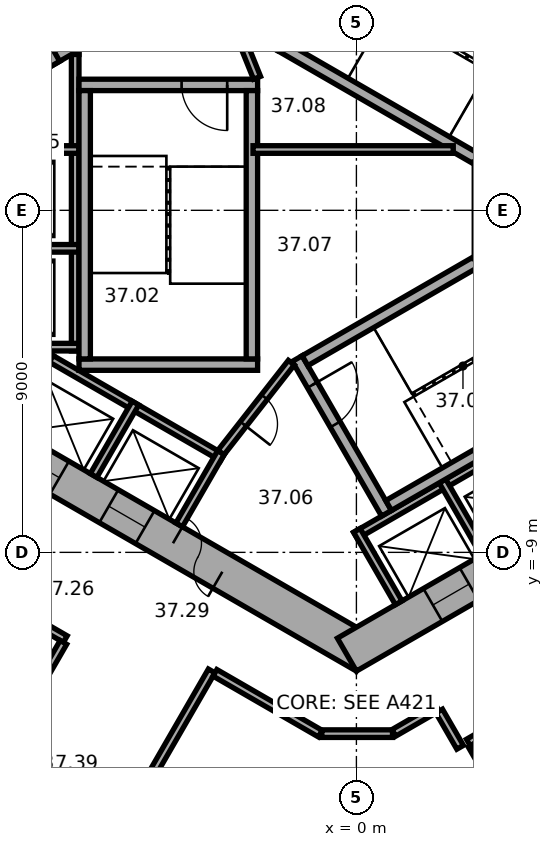
"""IFC4 building model, lengths in metres.
Left out: names, types, materials, properties, quantities, classifications, styles, units other than length and angle.
Written with IfcOpenShell. Run it as: python <this file> out.ifc"""

import sys

from ifc_helpers import new_model, si_unit, direction, frame, frame_2d, origin, place, context, subcontext, project, spatial, rectangle, extrude, element, fill, save


model = new_model("IFC4")
c1 = context("Model", 3, precision=1e-05, world=origin(), true_north=direction((0.0, 1.0)))
c2 = subcontext(c1, "Body", "Model", "MODEL_VIEW")
j1 = project(units=[si_unit("LENGTHUNIT", "METRE"), si_unit("PLANEANGLEUNIT", "RADIAN")], contexts=[c1])
p1 = place(None, origin())
s1 = spatial("IfcSite", under=j1, at=p1, CompositionType="ELEMENT")
p2 = place(p1, origin())
s2 = spatial("IfcBuilding", under=s1, at=p2, CompositionType="ELEMENT")
p3 = place(p2, frame((0.0, 0.0, 154.0)))
s3 = spatial("IfcBuildingStorey", under=s2, at=p3, CompositionType="ELEMENT", Elevation=154.0)
p4 = place(p3, frame((-10.25, -5.629, 0.0), z_axis=(0.0, 0.0, 1.0), x_axis=(0.866022616891, -0.50000482701, 0.0)))
e1 = element("IfcWall", 1, at=p4, inside=s3, PredefinedType="SHEAR", context=c2, shape_type="SweptSolid", body=[
    extrude(rectangle(XDim=12.125, YDim=1.0, at=frame_2d((6.062, 0.0))), origin(), (0.0, 0.0, 1.0), 3.7),
])
p5 = place(p4, frame((6.262, 0.0, 0.0)))
e2 = element("IfcOpeningElement", 2, at=p5, cuts=e1, PredefinedType="OPENING", context=c2, shape_type="SweptSolid", body=[
    extrude(rectangle(XDim=1.5, YDim=2.1, at=frame_2d((0.75, 1.05))), frame((0.0, 0.51, 0.0), z_axis=(0.0, -1.0, 0.0), x_axis=(1.0, 0.0, 0.0)), (0.0, 0.0, 1.0), 1.02),
])
p6 = place(p4, frame((1.712, 0.0, 0.0)))
e3 = element("IfcOpeningElement", 3, at=p6, cuts=e1, PredefinedType="OPENING", context=c2, shape_type="SweptSolid", body=[
    extrude(rectangle(XDim=1.1, YDim=2.1, at=frame_2d((0.55, 1.05))), frame((0.0, 0.51, 0.0), z_axis=(0.0, -1.0, 0.0), x_axis=(1.0, 0.0, 0.0)), (0.0, 0.0, 1.0), 1.02),
])
p7 = place(p4, frame((4.312, 0.0, 0.0)))
e4 = element("IfcOpeningElement", 4, at=p7, cuts=e1, PredefinedType="OPENING", context=c2, shape_type="SweptSolid", body=[
    extrude(rectangle(XDim=1.1, YDim=2.1, at=frame_2d((0.55, 1.05))), frame((0.0, 0.51, 0.0), z_axis=(0.0, -1.0, 0.0), x_axis=(1.0, 0.0, 0.0)), (0.0, 0.0, 1.0), 1.02),
])
p8 = place(p3, frame((-0.25, -11.691, 0.0), z_axis=(0.0, 0.0, 1.0), x_axis=(0.866022616891, 0.50000482701, 0.0)))
e5 = element("IfcWall", 5, at=p8, inside=s3, PredefinedType="SHEAR", context=c2, shape_type="SweptSolid", body=[
    extrude(rectangle(XDim=12.125, YDim=1.0, at=frame_2d((6.062, 0.0))), origin(), (0.0, 0.0, 1.0), 3.7),
])
p9 = place(p8, frame((2.612, 0.0, 0.0)))
e6 = element("IfcOpeningElement", 6, at=p9, cuts=e5, PredefinedType="OPENING", context=c2, shape_type="SweptSolid", body=[
    extrude(rectangle(XDim=1.1, YDim=2.1, at=frame_2d((0.55, 1.05))), frame((0.0, 0.51, 0.0), z_axis=(0.0, -1.0, 0.0), x_axis=(1.0, 0.0, 0.0)), (0.0, 0.0, 1.0), 1.02),
])
p10 = place(p8, frame((5.212, 0.0, 0.0)))
e7 = element("IfcOpeningElement", 7, at=p10, cuts=e5, PredefinedType="OPENING", context=c2, shape_type="SweptSolid", body=[
    extrude(rectangle(XDim=1.1, YDim=2.1, at=frame_2d((0.55, 1.05))), frame((0.0, 0.51, 0.0), z_axis=(0.0, -1.0, 0.0), x_axis=(1.0, 0.0, 0.0)), (0.0, 0.0, 1.0), 1.02),
])
p11 = place(p8, frame((7.812, 0.0, 0.0)))
e8 = element("IfcOpeningElement", 8, at=p11, cuts=e5, PredefinedType="OPENING", context=c2, shape_type="SweptSolid", body=[
    extrude(rectangle(XDim=1.1, YDim=2.1, at=frame_2d((0.55, 1.05))), frame((0.0, 0.51, 0.0), z_axis=(0.0, -1.0, 0.0), x_axis=(1.0, 0.0, 0.0)), (0.0, 0.0, 1.0), 1.02),
])
p12 = place(p3, frame((-18.789, -14.267, 0.0), z_axis=(0.0, 0.0, 1.0), x_axis=(0.866023315909, -0.500003616288, 0.0)))
e9 = element("IfcWall", 9, at=p12, inside=s3, PredefinedType="STANDARD", context=c2, shape_type="SweptSolid", body=[
    extrude(rectangle(XDim=20.044, YDim=0.2, at=frame_2d((10.022, 0.0))), origin(), (0.0, 0.0, 1.0), 3.7),
])
p13 = place(p12, frame((1.314, 0.0, 0.9)))
e10 = element("IfcOpeningElement", 10, at=p13, cuts=e9, PredefinedType="OPENING", context=c2, shape_type="SweptSolid", body=[
    extrude(rectangle(XDim=2.4, YDim=2.0, at=frame_2d((1.2, 1.0))), frame((0.0, 0.11, 0.0), z_axis=(0.0, -1.0, 0.0), x_axis=(1.0, 0.0, 0.0)), (0.0, 0.0, 1.0), 0.22),
])
p14 = place(p12, frame((5.069, 0.0, 0.9)))
e11 = element("IfcOpeningElement", 11, at=p14, cuts=e9, PredefinedType="OPENING", context=c2, shape_type="SweptSolid", body=[
    extrude(rectangle(XDim=2.4, YDim=2.0, at=frame_2d((1.2, 1.0))), frame((0.0, 0.11, 0.0), z_axis=(0.0, -1.0, 0.0), x_axis=(1.0, 0.0, 0.0)), (0.0, 0.0, 1.0), 0.22),
])
p15 = place(p12, frame((8.823, 0.0, 0.9)))
e12 = element("IfcOpeningElement", 12, at=p15, cuts=e9, PredefinedType="OPENING", context=c2, shape_type="SweptSolid", body=[
    extrude(rectangle(XDim=2.4, YDim=2.0, at=frame_2d((1.2, 1.0))), frame((0.0, 0.11, 0.0), z_axis=(0.0, -1.0, 0.0), x_axis=(1.0, 0.0, 0.0)), (0.0, 0.0, 1.0), 0.22),
])
p16 = place(p12, frame((12.577, 0.0, 0.9)))
e13 = element("IfcOpeningElement", 13, at=p16, cuts=e9, PredefinedType="OPENING", context=c2, shape_type="SweptSolid", body=[
    extrude(rectangle(XDim=2.4, YDim=2.0, at=frame_2d((1.2, 1.0))), frame((0.0, 0.11, 0.0), z_axis=(0.0, -1.0, 0.0), x_axis=(1.0, 0.0, 0.0)), (0.0, 0.0, 1.0), 0.22),
])
p17 = place(p12, frame((16.331, 0.0, 0.9)))
e14 = element("IfcOpeningElement", 14, at=p17, cuts=e9, PredefinedType="OPENING", context=c2, shape_type="SweptSolid", body=[
    extrude(rectangle(XDim=2.4, YDim=2.0, at=frame_2d((1.2, 1.0))), frame((0.0, 0.11, 0.0), z_axis=(0.0, -1.0, 0.0), x_axis=(1.0, 0.0, 0.0)), (0.0, 0.0, 1.0), 0.22),
])
p18 = place(p3, frame((2.911, -24.156, 0.0), z_axis=(0.0, 0.0, 1.0), x_axis=(0.833882163564, 0.551942512668, 0.0)))
e15 = element("IfcWall", 15, at=p18, inside=s3, PredefinedType="STANDARD", context=c2, shape_type="SweptSolid", body=[
    extrude(rectangle(XDim=20.044, YDim=0.2, at=frame_2d((10.022, 0.0))), origin(), (0.0, 0.0, 1.0), 3.7),
])
p19 = place(p18, frame((1.313, 0.0, 0.9)))
e16 = element("IfcOpeningElement", 16, at=p19, cuts=e15, PredefinedType="OPENING", context=c2, shape_type="SweptSolid", body=[
    extrude(rectangle(XDim=2.4, YDim=2.0, at=frame_2d((1.2, 1.0))), frame((0.0, 0.11, 0.0), z_axis=(0.0, -1.0, 0.0), x_axis=(1.0, 0.0, 0.0)), (0.0, 0.0, 1.0), 0.22),
])
p20 = place(p18, frame((5.067, 0.0, 0.9)))
e17 = element("IfcOpeningElement", 17, at=p20, cuts=e15, PredefinedType="OPENING", context=c2, shape_type="SweptSolid", body=[
    extrude(rectangle(XDim=2.4, YDim=2.0, at=frame_2d((1.2, 1.0))), frame((0.0, 0.11, 0.0), z_axis=(0.0, -1.0, 0.0), x_axis=(1.0, 0.0, 0.0)), (0.0, 0.0, 1.0), 0.22),
])
p21 = place(p18, frame((8.821, 0.0, 0.9)))
e18 = element("IfcOpeningElement", 18, at=p21, cuts=e15, PredefinedType="OPENING", context=c2, shape_type="SweptSolid", body=[
    extrude(rectangle(XDim=2.4, YDim=2.0, at=frame_2d((1.2, 1.0))), frame((0.0, 0.11, 0.0), z_axis=(0.0, -1.0, 0.0), x_axis=(1.0, 0.0, 0.0)), (0.0, 0.0, 1.0), 0.22),
])
p22 = place(p18, frame((12.575, 0.0, 0.9)))
e19 = element("IfcOpeningElement", 19, at=p22, cuts=e15, PredefinedType="OPENING", context=c2, shape_type="SweptSolid", body=[
    extrude(rectangle(XDim=2.4, YDim=2.0, at=frame_2d((1.2, 1.0))), frame((0.0, 0.11, 0.0), z_axis=(0.0, -1.0, 0.0), x_axis=(1.0, 0.0, 0.0)), (0.0, 0.0, 1.0), 0.22),
])
p23 = place(p18, frame((16.329, 0.0, 0.9)))
e20 = element("IfcOpeningElement", 20, at=p23, cuts=e15, PredefinedType="OPENING", context=c2, shape_type="SweptSolid", body=[
    extrude(rectangle(XDim=2.4, YDim=2.0, at=frame_2d((1.2, 1.0))), frame((0.0, 0.11, 0.0), z_axis=(0.0, -1.0, 0.0), x_axis=(1.0, 0.0, 0.0)), (0.0, 0.0, 1.0), 0.22),
])
p24 = place(p3, frame((-7.4, 4.3, 0.0), z_axis=(0.0, 0.0, 1.0), x_axis=(0.0, -1.0, 0.0)))
e21 = element("IfcWall", 21, at=p24, inside=s3, PredefinedType="PARTITIONING", context=c2, shape_type="SweptSolid", body=[
    extrude(rectangle(XDim=8.0, YDim=0.2, at=frame_2d((4.0, 0.0))), origin(), (0.0, 0.0, 1.0), 3.42),
])
for number, where, z_axis, x_axis in (
    (22, (-7.3, 4.2, 0.0), (0.0, 0.0, 1.0), (-1.0, 0.0, 0.0)),
    (23, (-7.3, 1.6, 0.0), (0.0, 0.0, 1.0), (-1.0, 0.0, 0.0)),
    (24, (-7.3, -1.0, 0.0), (0.0, 0.0, 1.0), (-1.0, 0.0, 0.0)),
    (25, (-7.3, -3.6, 0.0), (0.0, 0.0, 1.0), (-1.0, 0.0, 0.0)),
):
    element("IfcWall", number, at=place(p3, frame(where, z_axis=z_axis, x_axis=x_axis)), inside=s3, PredefinedType="PARTITIONING", context=c2, shape_type="SweptSolid", body=[
        extrude(rectangle(XDim=2.2, YDim=0.2, at=frame_2d((1.1, 0.0))), origin(), (0.0, 0.0, 1.0), 3.42),
    ])
p25 = place(p3, frame((-8.203, -3.809, 0.0), z_axis=(0.0, 0.0, 1.0), x_axis=(0.866028230842, -0.499995103361, 0.0)))
e26 = element("IfcWall", 26, at=p25, inside=s3, PredefinedType="PARTITIONING", context=c2, shape_type="SweptSolid", body=[
    extrude(rectangle(XDim=5.4, YDim=0.2, at=frame_2d((2.7, 0.0))), origin(), (0.0, 0.0, 1.0), 3.42),
])
for number, where, z_axis, x_axis in (
    (27, (-8.067, -3.772, 0.0), (0.0, 0.0, 1.0), (-0.5, -0.866, 0.0)),
    (28, (-5.815, -5.072, 0.0), (0.0, 0.0, 1.0), (-0.5, -0.866, 0.0)),
):
    element("IfcWall", number, at=place(p3, frame(where, z_axis=z_axis, x_axis=x_axis)), inside=s3, PredefinedType="PARTITIONING", context=c2, shape_type="SweptSolid", body=[
        extrude(rectangle(XDim=2.2, YDim=0.2, at=frame_2d((1.1, 0.0))), origin(), (0.0, 0.0, 1.0), 3.42),
    ])
p26 = place(p3, frame((-3.563, -6.372, 0.0), z_axis=(0.0, 0.0, 1.0), x_axis=(-0.499994660107, -0.866028486751, 0.0)))
e29 = element("IfcWall", 29, at=p26, inside=s3, PredefinedType="PARTITIONING", context=c2, shape_type="SweptSolid", body=[
    extrude(rectangle(XDim=2.2, YDim=0.2, at=frame_2d((1.1, 0.0))), origin(), (0.0, 0.0, 1.0), 3.42),
])
p27 = place(p3, frame((-0.024, -8.559, 0.0), z_axis=(0.0, 0.0, 1.0), x_axis=(0.866026010844, 0.49999894854, 0.0)))
e30 = element("IfcWall", 30, at=p27, inside=s3, PredefinedType="PARTITIONING", context=c2, shape_type="SweptSolid", body=[
    extrude(rectangle(XDim=8.0, YDim=0.2, at=frame_2d((4.0, 0.0))), origin(), (0.0, 0.0, 1.0), 3.42),
])
for number, where, z_axis, x_axis in (
    (31, (0.013, -8.422, 0.0), (0.0, 0.0, 1.0), (0.5, -0.866, 0.0)),
    (32, (2.264, -7.122, 0.0), (0.0, 0.0, 1.0), (0.5, -0.866, 0.0)),
):
    element("IfcWall", number, at=place(p3, frame(where, z_axis=z_axis, x_axis=x_axis)), inside=s3, PredefinedType="PARTITIONING", context=c2, shape_type="SweptSolid", body=[
        extrude(rectangle(XDim=2.2, YDim=0.2, at=frame_2d((1.1, 0.0))), origin(), (0.0, 0.0, 1.0), 3.42),
    ])
p28 = place(p3, frame((4.103, 0.807, 0.0), z_axis=(0.0, 0.0, 1.0), x_axis=(-0.866027801685, 0.499995846692, 0.0)))
e33 = element("IfcWall", 33, at=p28, inside=s3, PredefinedType="SHEAR", context=c2, shape_type="SweptSolid", body=[
    extrude(rectangle(XDim=7.06, YDim=0.3, at=frame_2d((3.53, 0.0))), origin(), (0.0, 0.0, 1.0), 3.42),
])
p29 = place(p3, frame((-2.6, 3.3, 0.0), z_axis=(0.0, 0.0, 1.0), x_axis=(-1.0, 0.0, 0.0)))
e34 = element("IfcWall", 34, at=p29, inside=s3, PredefinedType="SHEAR", context=c2, shape_type="SweptSolid", body=[
    extrude(rectangle(XDim=4.7, YDim=0.3, at=frame_2d((2.35, 0.0))), origin(), (0.0, 0.0, 1.0), 3.42),
])
p30 = place(p29, frame((0.8, 0.0, 0.0)))
e35 = element("IfcOpeningElement", 35, at=p30, cuts=e34, PredefinedType="OPENING", context=c2, shape_type="SweptSolid", body=[
    extrude(rectangle(XDim=1.2, YDim=2.1, at=frame_2d((0.6, 1.05))), frame((0.0, 0.16, 0.0), z_axis=(0.0, -1.0, 0.0), x_axis=(1.0, 0.0, 0.0)), (0.0, 0.0, 1.0), 0.32),
])
p31 = place(p3, frame((-2.6, -4.06, 0.0), z_axis=(0.0, 0.0, 1.0), x_axis=(-1.0, 0.0, 0.0)))
e36 = element("IfcWall", 36, at=p31, inside=s3, PredefinedType="SHEAR", context=c2, shape_type="SweptSolid", body=[
    extrude(rectangle(XDim=4.7, YDim=0.3, at=frame_2d((2.35, 0.0))), origin(), (0.0, 0.0, 1.0), 3.42),
])
for number, where, z_axis, x_axis in (
    (37, (-2.75, 3.15, 0.0), (0.0, 0.0, 1.0), (0.0, -1.0, 0.0)),
    (38, (-7.15, 3.15, 0.0), (0.0, 0.0, 1.0), (0.0, -1.0, 0.0)),
):
    element("IfcWall", number, at=place(p3, frame(where, z_axis=z_axis, x_axis=x_axis)), inside=s3, PredefinedType="SHEAR", context=c2, shape_type="SweptSolid", body=[
        extrude(rectangle(XDim=7.06, YDim=0.3, at=frame_2d((3.53, 0.0))), origin(), (0.0, 0.0, 1.0), 3.42),
    ])
p32 = place(p3, frame((-1.558, -3.902, 0.0), z_axis=(0.0, 0.0, 1.0), x_axis=(0.499977259774, -0.866038532462, 0.0)))
e39 = element("IfcWall", 39, at=p32, inside=s3, PredefinedType="SHEAR", context=c2, shape_type="SweptSolid", body=[
    extrude(rectangle(XDim=4.7, YDim=0.3, at=frame_2d((2.35, 0.0))), origin(), (0.0, 0.0, 1.0), 3.42),
])
p33 = place(p32, frame((0.8, 0.0, 0.0)))
e40 = element("IfcOpeningElement", 40, at=p33, cuts=e39, PredefinedType="OPENING", context=c2, shape_type="SweptSolid", body=[
    extrude(rectangle(XDim=1.2, YDim=2.1, at=frame_2d((0.6, 1.05))), frame((0.0, 0.16, 0.0), z_axis=(0.0, -1.0, 0.0), x_axis=(1.0, 0.0, 0.0)), (0.0, 0.0, 1.0), 0.32),
])
for number, where, z_axis, x_axis in (
    (41, (-1.353, -3.957, 0.0), (0.0, 0.0, 1.0), (0.866, 0.5, 0.0)),
    (42, (0.847, -7.767, 0.0), (0.0, 0.0, 1.0), (0.866, 0.5, 0.0)),
):
    element("IfcWall", number, at=place(p3, frame(where, z_axis=z_axis, x_axis=x_axis)), inside=s3, PredefinedType="SHEAR", context=c2, shape_type="SweptSolid", body=[
        extrude(rectangle(XDim=7.06, YDim=0.3, at=frame_2d((3.53, 0.0))), origin(), (0.0, 0.0, 1.0), 3.42),
    ])
p34 = place(p3, frame((-5.24, 5.577, 0.0), z_axis=(0.0, 0.0, 1.0), x_axis=(-0.866014461049, -0.500018952895, 0.0)))
e43 = element("IfcWall", 43, at=p34, inside=s3, PredefinedType="SHEAR", context=c2, shape_type="SweptSolid", body=[
    extrude(rectangle(XDim=3.35, YDim=0.3, at=frame_2d((1.675, 0.0))), origin(), (0.0, 0.0, 1.0), 3.42),
])
p35 = place(p3, frame((-7.937, 3.847, 0.0), z_axis=(0.0, 0.0, 1.0), x_axis=(-0.50002983664, 0.866008176907, 0.0)))
e44 = element("IfcWall", 44, at=p35, inside=s3, PredefinedType="SHEAR", context=c2, shape_type="SweptSolid", body=[
    extrude(rectangle(XDim=2.2, YDim=0.3, at=frame_2d((1.1, 0.0))), origin(), (0.0, 0.0, 1.0), 3.42),
])
p36 = place(p3, frame((-2.615, 3.487, 0.0), z_axis=(0.0, 0.0, 1.0), x_axis=(-0.373576831041, 0.92759924068, 0.0)))
e45 = element("IfcWall", 45, at=p36, inside=s3, PredefinedType="PARTITIONING", context=c2, shape_type="SweptSolid", body=[
    extrude(rectangle(XDim=3.002, YDim=0.2, at=frame_2d((1.501, 0.0))), origin(), (0.0, 0.0, 1.0), 3.42),
])
p37 = place(p36, frame((1.15, 0.0, 0.0)))
e46 = element("IfcOpeningElement", 46, at=p37, cuts=e45, PredefinedType="OPENING", context=c2, shape_type="SweptSolid", body=[
    extrude(rectangle(XDim=0.9, YDim=2.1, at=frame_2d((0.45, 1.05))), frame((0.0, 0.11, 0.0), z_axis=(0.0, -1.0, 0.0), x_axis=(1.0, 0.0, 0.0)), (0.0, 0.0, 1.0), 0.22),
])
p38 = place(p3, frame((-1.712, -4.008, 0.0), z_axis=(0.0, 0.0, 1.0), x_axis=(-0.616549420702, -0.787316208287, 0.0)))
e47 = element("IfcWall", 47, at=p38, inside=s3, PredefinedType="PARTITIONING", context=c2, shape_type="SweptSolid", body=[
    extrude(rectangle(XDim=3.002, YDim=0.2, at=frame_2d((1.501, 0.0))), origin(), (0.0, 0.0, 1.0), 3.42),
])
p39 = place(p38, frame((1.15, 0.0, 0.0)))
e48 = element("IfcOpeningElement", 48, at=p39, cuts=e47, PredefinedType="OPENING", context=c2, shape_type="SweptSolid", body=[
    extrude(rectangle(XDim=0.9, YDim=2.1, at=frame_2d((0.45, 1.05))), frame((0.0, 0.11, 0.0), z_axis=(0.0, -1.0, 0.0), x_axis=(1.0, 0.0, 0.0)), (0.0, 0.0, 1.0), 0.22),
])
p40 = place(p3, frame((-2.72, 1.6, 0.0), z_axis=(0.0, 0.0, 1.0), x_axis=(1.0, 0.0, 0.0)))
e49 = element("IfcWall", 49, at=p40, inside=s3, PredefinedType="PARTITIONING", context=c2, shape_type="SweptSolid", body=[
    extrude(rectangle(XDim=5.269, YDim=0.2, at=frame_2d((2.634, 0.0))), origin(), (0.0, 0.0, 1.0), 3.42),
])
p41 = place(p3, frame((-11.435, -9.103, 0.0), z_axis=(0.0, 0.0, 1.0), x_axis=(0.866007399799, -0.500031182522, 0.0)))
e50 = element("IfcWall", 50, at=p41, inside=s3, PredefinedType="PARTITIONING", context=c2, shape_type="SweptSolid", body=[
    extrude(rectangle(XDim=4.358, YDim=0.2, at=frame_2d((2.179, 0.0))), origin(), (0.0, 0.0, 1.0), 3.42),
])
p42 = place(p3, frame((-11.235, -17.474, 0.0), z_axis=(0.0, 0.0, 1.0), x_axis=(0.500009260695, 0.866020057054, 0.0)))
e51 = element("IfcWall", 51, at=p42, inside=s3, PredefinedType="PARTITIONING", context=c2, shape_type="SweptSolid", body=[
    extrude(rectangle(XDim=7.049, YDim=0.2, at=frame_2d((3.524, 0.0))), origin(), (0.0, 0.0, 1.0), 2.87),
])
p43 = place(p42, frame((3.024, 0.0, 0.0)))
e52 = element("IfcOpeningElement", 52, at=p43, cuts=e51, PredefinedType="OPENING", context=c2, shape_type="SweptSolid", body=[
    extrude(rectangle(XDim=1.0, YDim=2.1, at=frame_2d((0.5, 1.05))), frame((0.0, 0.11, 0.0), z_axis=(0.0, -1.0, 0.0), x_axis=(1.0, 0.0, 0.0)), (0.0, 0.0, 1.0), 0.22),
])
p44 = place(p3, frame((-7.984, -19.351, 0.0), z_axis=(0.0, 0.0, 1.0), x_axis=(0.500010139422, 0.866019549707, 0.0)))
e53 = element("IfcWall", 53, at=p44, inside=s3, PredefinedType="PARTITIONING", context=c2, shape_type="SweptSolid", body=[
    extrude(rectangle(XDim=8.35, YDim=0.2, at=frame_2d((4.175, 0.0))), origin(), (0.0, 0.0, 1.0), 3.42),
])
p45 = place(p44, frame((3.675, 0.0, 0.0)))
e54 = element("IfcOpeningElement", 54, at=p45, cuts=e53, PredefinedType="OPENING", context=c2, shape_type="SweptSolid", body=[
    extrude(rectangle(XDim=1.0, YDim=2.1, at=frame_2d((0.5, 1.05))), frame((0.0, 0.11, 0.0), z_axis=(0.0, -1.0, 0.0), x_axis=(1.0, 0.0, 0.0)), (0.0, 0.0, 1.0), 0.22),
])
p46 = place(p3, frame((-3.722, -12.169, 0.0), z_axis=(0.0, 0.0, 1.0), x_axis=(0.866033163891, -0.499986558861, 0.0)))
e55 = element("IfcWall", 55, at=p46, inside=s3, PredefinedType="PARTITIONING", context=c2, shape_type="SweptSolid", body=[
    extrude(rectangle(XDim=3.201, YDim=0.2, at=frame_2d((1.6, 0.0))), origin(), (0.0, 0.0, 1.0), 3.42),
])
p47 = place(p3, frame((-0.91, -13.77, 0.0), z_axis=(0.0, 0.0, 1.0), x_axis=(1.0, 0.0, 0.0)))
e56 = element("IfcWall", 56, at=p47, inside=s3, PredefinedType="PARTITIONING", context=c2, shape_type="SweptSolid", body=[
    extrude(rectangle(XDim=1.86, YDim=0.2, at=frame_2d((0.93, 0.0))), origin(), (0.0, 0.0, 1.0), 3.42),
])
p48 = place(p3, frame((0.985, -13.75, 0.0), z_axis=(0.0, 0.0, 1.0), x_axis=(0.866028661061, 0.499994358189, 0.0)))
e57 = element("IfcWall", 57, at=p48, inside=s3, PredefinedType="PARTITIONING", context=c2, shape_type="SweptSolid", body=[
    extrude(rectangle(XDim=1.321, YDim=0.2, at=frame_2d((0.661, 0.0))), origin(), (0.0, 0.0, 1.0), 3.42),
])
p49 = place(p3, frame((2.179, -13.176, 0.0), z_axis=(0.0, 0.0, 1.0), x_axis=(0.499978356969, -0.866037899034, 0.0)))
e58 = element("IfcWall", 58, at=p49, inside=s3, PredefinedType="PARTITIONING", context=c2, shape_type="SweptSolid", body=[
    extrude(rectangle(XDim=1.101, YDim=0.2, at=frame_2d((0.551, 0.0))), origin(), (0.0, 0.0, 1.0), 3.42),
])
p50 = place(p3, frame((2.946, -14.004, 0.0), z_axis=(0.0, 0.0, 1.0), x_axis=(0.866008176907, 0.50002983664, 0.0)))
e59 = element("IfcWall", 59, at=p50, inside=s3, PredefinedType="PARTITIONING", context=c2, shape_type="SweptSolid", body=[
    extrude(rectangle(XDim=2.2, YDim=0.2, at=frame_2d((1.1, 0.0))), origin(), (0.0, 0.0, 1.0), 3.42),
])
p51 = place(p3, frame((4.246, -16.256, 0.0), z_axis=(0.0, 0.0, 1.0), x_axis=(-0.499961950354, 0.866047370643, 0.0)))
e60 = element("IfcWall", 60, at=p51, inside=s3, PredefinedType="PARTITIONING", context=c2, shape_type="SweptSolid", body=[
    extrude(rectangle(XDim=2.5, YDim=0.12, at=frame_2d((1.25, 0.0))), origin(), (0.0, 0.0, 1.0), 3.42),
])
p52 = place(p51, frame((0.8, 0.0, 0.0)))
e61 = element("IfcOpeningElement", 61, at=p52, cuts=e60, PredefinedType="OPENING", context=c2, shape_type="SweptSolid", body=[
    extrude(rectangle(XDim=0.9, YDim=2.1, at=frame_2d((0.45, 1.05))), frame((0.0, 0.07, 0.0), z_axis=(0.0, -1.0, 0.0), x_axis=(1.0, 0.0, 0.0)), (0.0, 0.0, 1.0), 0.14),
])
p53 = place(p5, origin())
e62 = element("IfcDoor", 62, at=p53, inside=s3, OperationType="DOUBLE_DOOR_SINGLE_SWING", PredefinedType="DOOR", context=c2, shape_type="SweptSolid", body=[
    extrude(rectangle(XDim=1.5, YDim=2.1, at=frame_2d((0.75, 1.05))), frame((0.0, 0.025, 0.0), z_axis=(0.0, -1.0, 0.0), x_axis=(1.0, 0.0, 0.0)), (0.0, 0.0, 1.0), 0.05),
])
fill(e2, e62)
p54 = place(p30, origin())
e63 = element("IfcDoor", 63, at=p54, inside=s3, OperationType="SINGLE_SWING_RIGHT", PredefinedType="DOOR", context=c2, shape_type="SweptSolid", body=[
    extrude(rectangle(XDim=1.2, YDim=2.1, at=frame_2d((0.6, 1.05))), frame((0.0, 0.025, 0.0), z_axis=(0.0, -1.0, 0.0), x_axis=(1.0, 0.0, 0.0)), (0.0, 0.0, 1.0), 0.05),
])
fill(e35, e63)
p55 = place(p33, origin())
e64 = element("IfcDoor", 64, at=p55, inside=s3, OperationType="SINGLE_SWING_RIGHT", PredefinedType="DOOR", context=c2, shape_type="SweptSolid", body=[
    extrude(rectangle(XDim=1.2, YDim=2.1, at=frame_2d((0.6, 1.05))), frame((0.0, 0.025, 0.0), z_axis=(0.0, -1.0, 0.0), x_axis=(1.0, 0.0, 0.0)), (0.0, 0.0, 1.0), 0.05),
])
fill(e40, e64)
p56 = place(p39, origin())
e65 = element("IfcDoor", 65, at=p56, inside=s3, OperationType="SINGLE_SWING_LEFT", PredefinedType="DOOR", context=c2, shape_type="SweptSolid", body=[
    extrude(rectangle(XDim=0.9, YDim=2.1, at=frame_2d((0.45, 1.05))), frame((0.0, 0.025, 0.0), z_axis=(0.0, -1.0, 0.0), x_axis=(1.0, 0.0, 0.0)), (0.0, 0.0, 1.0), 0.05),
])
fill(e48, e65)
p57 = place(p6, origin())
e66 = element("IfcDoor", 66, at=p57, inside=s3, OperationType="DOUBLE_DOOR_SLIDING", PredefinedType="DOOR", context=c2, shape_type="SweptSolid", body=[
    extrude(rectangle(XDim=1.1, YDim=2.1, at=frame_2d((0.55, 1.05))), frame((0.0, 0.025, 0.0), z_axis=(0.0, -1.0, 0.0), x_axis=(1.0, 0.0, 0.0)), (0.0, 0.0, 1.0), 0.05),
])
fill(e3, e66)
p58 = place(p7, origin())
e67 = element("IfcDoor", 67, at=p58, inside=s3, OperationType="DOUBLE_DOOR_SLIDING", PredefinedType="DOOR", context=c2, shape_type="SweptSolid", body=[
    extrude(rectangle(XDim=1.1, YDim=2.1, at=frame_2d((0.55, 1.05))), frame((0.0, 0.025, 0.0), z_axis=(0.0, -1.0, 0.0), x_axis=(1.0, 0.0, 0.0)), (0.0, 0.0, 1.0), 0.05),
])
fill(e4, e67)
p59 = place(p9, origin())
e68 = element("IfcDoor", 68, at=p59, inside=s3, OperationType="DOUBLE_DOOR_SLIDING", PredefinedType="DOOR", context=c2, shape_type="SweptSolid", body=[
    extrude(rectangle(XDim=1.1, YDim=2.1, at=frame_2d((0.55, 1.05))), frame((0.0, 0.025, 0.0), z_axis=(0.0, -1.0, 0.0), x_axis=(1.0, 0.0, 0.0)), (0.0, 0.0, 1.0), 0.05),
])
fill(e6, e68)
save(model, sys.argv[1])
